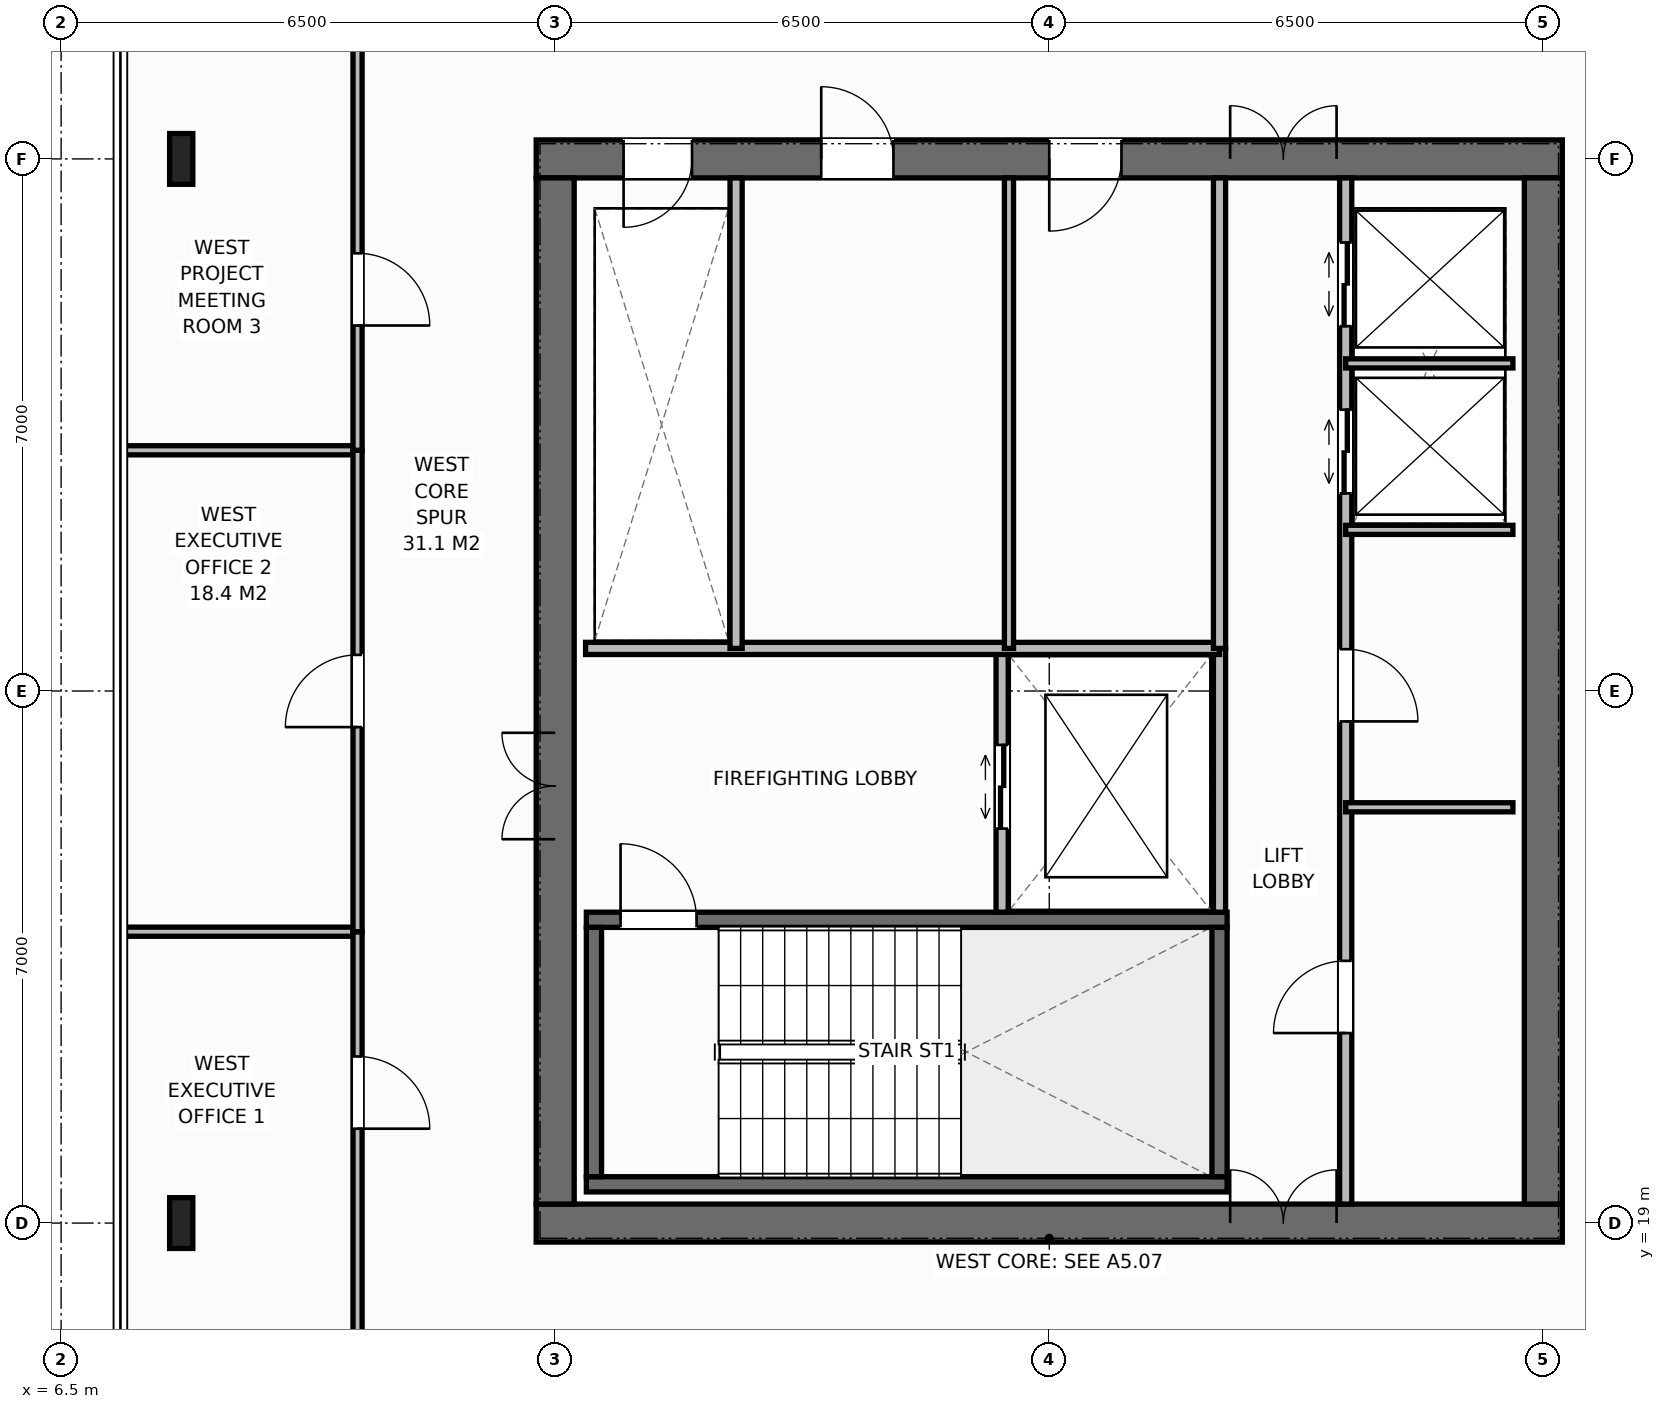
"""IFC4 building model, lengths in metres.
Left out: names, types, materials, properties, quantities, classifications, styles, units other than length and angle.
Written with IfcOpenShell. Run it as: python <this file> out.ifc"""

import sys

from ifc_helpers import new_model, si_unit, direction, frame, frame_2d, origin, origin_2d, place, context, subcontext, project, spatial, rectangle, i_section, extrude, element, fill, save


model = new_model("IFC4")
c1 = context("Model", 3, precision=1e-05, world=origin(), true_north=direction((0.0, 1.0)))
c2 = subcontext(c1, "Body", "Model", "MODEL_VIEW")
j1 = project(units=[si_unit("LENGTHUNIT", "METRE"), si_unit("PLANEANGLEUNIT", "RADIAN")], contexts=[c1])
p1 = place(None, origin())
s1 = spatial("IfcSite", under=j1, at=p1, CompositionType="ELEMENT")
p2 = place(p1, origin())
s2 = spatial("IfcBuilding", under=s1, at=p2, CompositionType="ELEMENT")
p3 = place(p2, frame((0.0, 0.0, 290.4)))
s3 = spatial("IfcBuildingStorey", under=s2, at=p3, CompositionType="ELEMENT", Elevation=290.4)
p4 = place(p3, frame((12.75, 19.0, 0.0), z_axis=(0.0, 0.0, 1.0), x_axis=(1.0, 0.0, 0.0)))
e1 = element("IfcWall", 1, at=p4, inside=s3, PredefinedType="SHEAR", context=c2, shape_type="SweptSolid", body=[
    extrude(rectangle(XDim=13.5, YDim=0.5, at=frame_2d((6.75, 0.0))), origin(), (0.0, 0.0, 1.0), 4.0),
])
p5 = place(p4, frame((9.13, 0.0, 0.0)))
e2 = element("IfcOpeningElement", 2, at=p5, cuts=e1, PredefinedType="OPENING", context=c2, shape_type="SweptSolid", body=[
    extrude(rectangle(XDim=1.4, YDim=2.2, at=frame_2d((0.7, 1.1))), frame((0.0, 0.26, 0.0), z_axis=(0.0, -1.0, 0.0), x_axis=(1.0, 0.0, 0.0)), (0.0, 0.0, 1.0), 0.52),
])
p6 = place(p3, frame((12.75, 33.0, 0.0), z_axis=(0.0, 0.0, 1.0), x_axis=(1.0, 0.0, 0.0)))
e3 = element("IfcWall", 3, at=p6, inside=s3, PredefinedType="SHEAR", context=c2, shape_type="SweptSolid", body=[
    extrude(rectangle(XDim=13.5, YDim=0.5, at=frame_2d((6.75, 0.0))), origin(), (0.0, 0.0, 1.0), 4.0),
])
p7 = place(p6, frame((1.15, 0.0, 0.0)))
e4 = element("IfcOpeningElement", 4, at=p7, cuts=e3, PredefinedType="OPENING", context=c2, shape_type="SweptSolid", body=[
    extrude(rectangle(XDim=0.9, YDim=2.15, at=frame_2d((0.45, 1.075))), frame((0.0, 0.26, 0.0), z_axis=(0.0, -1.0, 0.0), x_axis=(1.0, 0.0, 0.0)), (0.0, 0.0, 1.0), 0.52),
])
p8 = place(p6, frame((3.75, 0.0, 0.0)))
e5 = element("IfcOpeningElement", 5, at=p8, cuts=e3, PredefinedType="OPENING", context=c2, shape_type="SweptSolid", body=[
    extrude(rectangle(XDim=0.95, YDim=2.15, at=frame_2d((0.475, 1.075))), frame((0.0, 0.26, 0.0), z_axis=(0.0, -1.0, 0.0), x_axis=(1.0, 0.0, 0.0)), (0.0, 0.0, 1.0), 0.52),
])
p9 = place(p6, frame((6.75, 0.0, 0.0)))
e6 = element("IfcOpeningElement", 6, at=p9, cuts=e3, PredefinedType="OPENING", context=c2, shape_type="SweptSolid", body=[
    extrude(rectangle(XDim=0.95, YDim=2.15, at=frame_2d((0.475, 1.075))), frame((0.0, 0.26, 0.0), z_axis=(0.0, -1.0, 0.0), x_axis=(1.0, 0.0, 0.0)), (0.0, 0.0, 1.0), 0.52),
])
p10 = place(p6, frame((9.13, 0.0, 0.0)))
e7 = element("IfcOpeningElement", 7, at=p10, cuts=e3, PredefinedType="OPENING", context=c2, shape_type="SweptSolid", body=[
    extrude(rectangle(XDim=1.4, YDim=2.2, at=frame_2d((0.7, 1.1))), frame((0.0, 0.26, 0.0), z_axis=(0.0, -1.0, 0.0), x_axis=(1.0, 0.0, 0.0)), (0.0, 0.0, 1.0), 0.52),
])
p11 = place(p3, frame((13.0, 19.25, 0.0), z_axis=(0.0, 0.0, 1.0), x_axis=(0.0, 1.0, 0.0)))
e8 = element("IfcWall", 8, at=p11, inside=s3, PredefinedType="SHEAR", context=c2, shape_type="SweptSolid", body=[
    extrude(rectangle(XDim=13.5, YDim=0.5, at=frame_2d((6.75, 0.0))), origin(), (0.0, 0.0, 1.0), 4.0),
])
p12 = place(p11, frame((4.8, 0.0, 0.0)))
e9 = element("IfcOpeningElement", 9, at=p12, cuts=e8, PredefinedType="OPENING", context=c2, shape_type="SweptSolid", body=[
    extrude(rectangle(XDim=1.4, YDim=2.2, at=frame_2d((0.7, 1.1))), frame((0.0, 0.26, 0.0), z_axis=(0.0, -1.0, 0.0), x_axis=(1.0, 0.0, 0.0)), (0.0, 0.0, 1.0), 0.52),
])
p13 = place(p3, frame((26.0, 19.25, 0.0), z_axis=(0.0, 0.0, 1.0), x_axis=(0.0, 1.0, 0.0)))
e10 = element("IfcWall", 10, at=p13, inside=s3, PredefinedType="SHEAR", context=c2, shape_type="SweptSolid", body=[
    extrude(rectangle(XDim=13.5, YDim=0.5, at=frame_2d((6.75, 0.0))), origin(), (0.0, 0.0, 1.0), 4.0),
])
p14 = place(p3, frame((13.41, 19.51, 0.0), z_axis=(0.0, 0.0, 1.0), x_axis=(1.0, 0.0, 0.0)))
e11 = element("IfcWall", 11, at=p14, inside=s3, PredefinedType="SHEAR", context=c2, shape_type="SweptSolid", body=[
    extrude(rectangle(XDim=8.43, YDim=0.2, at=frame_2d((4.215, 0.0))), origin(), (0.0, 0.0, 1.0), 4.0),
])
p15 = place(p3, frame((13.41, 22.99, 0.0), z_axis=(0.0, 0.0, 1.0), x_axis=(1.0, 0.0, 0.0)))
e12 = element("IfcWall", 12, at=p15, inside=s3, PredefinedType="SHEAR", context=c2, shape_type="SweptSolid", body=[
    extrude(rectangle(XDim=8.43, YDim=0.2, at=frame_2d((4.215, 0.0))), origin(), (0.0, 0.0, 1.0), 4.0),
])
p16 = place(p15, frame((0.45, 0.0, 0.0)))
e13 = element("IfcOpeningElement", 13, at=p16, cuts=e12, PredefinedType="OPENING", context=c2, shape_type="SweptSolid", body=[
    extrude(rectangle(XDim=1.0, YDim=2.15, at=frame_2d((0.5, 1.075))), frame((0.0, 0.11, 0.0), z_axis=(0.0, -1.0, 0.0), x_axis=(1.0, 0.0, 0.0)), (0.0, 0.0, 1.0), 0.22),
])
for number, where, z_axis, x_axis in (
    (14, (13.51, 19.61, 0.0), (0.0, 0.0, 1.0), (0.0, 1.0, 0.0)),
    (15, (21.74, 19.61, 0.0), (0.0, 0.0, 1.0), (0.0, 1.0, 0.0)),
):
    element("IfcWall", number, at=place(p3, frame(where, z_axis=z_axis, x_axis=x_axis)), inside=s3, PredefinedType="SHEAR", context=c2, shape_type="SweptSolid", body=[
        extrude(rectangle(XDim=3.28, YDim=0.2, at=frame_2d((1.64, 0.0))), origin(), (0.0, 0.0, 1.0), 4.0),
    ])
for number, where, z_axis, x_axis in (
    (16, (8.08, 19.0, 0.0), (0.0, 0.0, 1.0), (1.0, 0.0, 0.0)),
    (17, (8.08, 33.0, 0.0), (0.0, 0.0, 1.0), (1.0, 0.0, 0.0)),
):
    element("IfcColumn", number, at=place(p3, frame(where, z_axis=z_axis, x_axis=x_axis)), inside=s3, PredefinedType="COLUMN", context=c2, shape_type="SweptSolid", body=[
        extrude(i_section(OverallWidth=0.305, OverallDepth=0.668, WebThickness=0.021, FlangeThickness=0.04, at=origin_2d()), origin(), (0.0, 0.0, 1.0), 4.0),
    ])
p17 = place(p3, frame((21.74, 23.09, 0.0), z_axis=(0.0, 0.0, 1.0), x_axis=(0.0, 1.0, 0.0)))
e18 = element("IfcWall", 18, at=p17, inside=s3, PredefinedType="STANDARD", context=c2, shape_type="SweptSolid", body=[
    extrude(rectangle(XDim=3.47, YDim=0.16, at=frame_2d((1.735, 0.0))), origin(), (0.0, 0.0, 1.0), 3.788),
])
p18 = place(p3, frame((18.88, 23.09, 0.0), z_axis=(0.0, 0.0, 1.0), x_axis=(0.0, 1.0, 0.0)))
e19 = element("IfcWall", 19, at=p18, inside=s3, PredefinedType="STANDARD", context=c2, shape_type="SweptSolid", body=[
    extrude(rectangle(XDim=3.47, YDim=0.16, at=frame_2d((1.735, 0.0))), origin(), (0.0, 0.0, 1.0), 3.788),
])
p19 = place(p18, frame((1.1, 0.0, 0.0)))
e20 = element("IfcOpeningElement", 20, at=p19, cuts=e19, PredefinedType="OPENING", context=c2, shape_type="SweptSolid", body=[
    extrude(rectangle(XDim=1.1, YDim=2.2, at=frame_2d((0.55, 1.1))), frame((0.0, 0.09, 0.0), z_axis=(0.0, -1.0, 0.0), x_axis=(1.0, 0.0, 0.0)), (0.0, 0.0, 1.0), 0.18),
])
p20 = place(p3, frame((13.4, 26.56, 0.0), z_axis=(0.0, 0.0, 1.0), x_axis=(1.0, 0.0, 0.0)))
e21 = element("IfcWall", 21, at=p20, inside=s3, PredefinedType="STANDARD", context=c2, shape_type="SweptSolid", body=[
    extrude(rectangle(XDim=8.34, YDim=0.16, at=frame_2d((4.17, 0.0))), origin(), (0.0, 0.0, 1.0), 3.788),
])
p21 = place(p3, frame((15.38, 26.56, 0.0), z_axis=(0.0, 0.0, 1.0), x_axis=(0.0, 1.0, 0.0)))
e22 = element("IfcWall", 22, at=p21, inside=s3, PredefinedType="STANDARD", context=c2, shape_type="SweptSolid", body=[
    extrude(rectangle(XDim=6.19, YDim=0.16, at=frame_2d((3.095, 0.0))), origin(), (0.0, 0.0, 1.0), 3.788),
])
p22 = place(p3, frame((18.97, 26.56, 0.0), z_axis=(0.0, 0.0, 1.0), x_axis=(0.0, 1.0, 0.0)))
e23 = element("IfcWall", 23, at=p22, inside=s3, PredefinedType="PARTITIONING", context=c2, shape_type="SweptSolid", body=[
    extrude(rectangle(XDim=6.19, YDim=0.12, at=frame_2d((3.095, 0.0))), origin(), (0.0, 0.0, 1.0), 3.788),
])
p23 = place(p3, frame((21.74, 26.56, 0.0), z_axis=(0.0, 0.0, 1.0), x_axis=(0.0, 1.0, 0.0)))
e24 = element("IfcWall", 24, at=p23, inside=s3, PredefinedType="STANDARD", context=c2, shape_type="SweptSolid", body=[
    extrude(rectangle(XDim=6.19, YDim=0.16, at=frame_2d((3.095, 0.0))), origin(), (0.0, 0.0, 1.0), 3.788),
])
p24 = place(p3, frame((23.4, 19.25, 0.0), z_axis=(0.0, 0.0, 1.0), x_axis=(0.0, 1.0, 0.0)))
e25 = element("IfcWall", 25, at=p24, inside=s3, PredefinedType="STANDARD", context=c2, shape_type="SweptSolid", body=[
    extrude(rectangle(XDim=13.5, YDim=0.16, at=frame_2d((6.75, 0.0))), origin(), (0.0, 0.0, 1.0), 3.788),
])
p25 = place(p24, frame((2.25, 0.0, 0.0)))
e26 = element("IfcOpeningElement", 26, at=p25, cuts=e25, PredefinedType="OPENING", context=c2, shape_type="SweptSolid", body=[
    extrude(rectangle(XDim=0.95, YDim=2.15, at=frame_2d((0.475, 1.075))), frame((0.0, 0.09, 0.0), z_axis=(0.0, -1.0, 0.0), x_axis=(1.0, 0.0, 0.0)), (0.0, 0.0, 1.0), 0.18),
])
p26 = place(p24, frame((6.35, 0.0, 0.0)))
e27 = element("IfcOpeningElement", 27, at=p26, cuts=e25, PredefinedType="OPENING", context=c2, shape_type="SweptSolid", body=[
    extrude(rectangle(XDim=0.95, YDim=2.15, at=frame_2d((0.475, 1.075))), frame((0.0, 0.09, 0.0), z_axis=(0.0, -1.0, 0.0), x_axis=(1.0, 0.0, 0.0)), (0.0, 0.0, 1.0), 0.18),
])
p27 = place(p24, frame((9.35, 0.0, 0.0)))
e28 = element("IfcOpeningElement", 28, at=p27, cuts=e25, PredefinedType="OPENING", context=c2, shape_type="SweptSolid", body=[
    extrude(rectangle(XDim=1.1, YDim=2.2, at=frame_2d((0.55, 1.1))), frame((0.0, 0.09, 0.0), z_axis=(0.0, -1.0, 0.0), x_axis=(1.0, 0.0, 0.0)), (0.0, 0.0, 1.0), 0.18),
])
p28 = place(p24, frame((11.55, 0.0, 0.0)))
e29 = element("IfcOpeningElement", 29, at=p28, cuts=e25, PredefinedType="OPENING", context=c2, shape_type="SweptSolid", body=[
    extrude(rectangle(XDim=1.1, YDim=2.2, at=frame_2d((0.55, 1.1))), frame((0.0, 0.09, 0.0), z_axis=(0.0, -1.0, 0.0), x_axis=(1.0, 0.0, 0.0)), (0.0, 0.0, 1.0), 0.18),
])
for number, where, z_axis, x_axis in (
    (30, (23.4, 24.47, 0.0), (0.0, 0.0, 1.0), (1.0, 0.0, 0.0)),
    (31, (23.4, 28.12, 0.0), (0.0, 0.0, 1.0), (1.0, 0.0, 0.0)),
    (32, (23.4, 30.31, 0.0), (0.0, 0.0, 1.0), (1.0, 0.0, 0.0)),
):
    element("IfcWall", number, at=place(p3, frame(where, z_axis=z_axis, x_axis=x_axis)), inside=s3, PredefinedType="PARTITIONING", context=c2, shape_type="SweptSolid", body=[
        extrude(rectangle(XDim=2.2, YDim=0.12, at=frame_2d((1.1, 0.0))), origin(), (0.0, 0.0, 1.0), 3.788),
    ])
p29 = place(p3, frame((7.22, 22.833, 0.0), z_axis=(0.0, 0.0, 1.0), x_axis=(1.0, 0.0, 0.0)))
e33 = element("IfcWall", 33, at=p29, inside=s3, PredefinedType="PARTITIONING", context=c2, shape_type="SweptSolid", body=[
    extrude(rectangle(XDim=3.18, YDim=0.12, at=frame_2d((1.59, 0.0))), origin(), (0.0, 0.0, 1.0), 3.788),
])
p30 = place(p3, frame((10.4, 16.5, 0.0), z_axis=(0.0, 0.0, 1.0), x_axis=(0.0, 1.0, 0.0)))
e34 = element("IfcWall", 34, at=p30, inside=s3, PredefinedType="PARTITIONING", context=c2, shape_type="SweptSolid", body=[
    extrude(rectangle(XDim=6.333, YDim=0.12, at=frame_2d((3.167, 0.0))), origin(), (0.0, 0.0, 1.0), 3.788),
])
p31 = place(p30, frame((3.742, 0.0, 0.0)))
e35 = element("IfcOpeningElement", 35, at=p31, cuts=e34, PredefinedType="OPENING", context=c2, shape_type="SweptSolid", body=[
    extrude(rectangle(XDim=0.95, YDim=2.15, at=frame_2d((0.475, 1.075))), frame((0.0, 0.07, 0.0), z_axis=(0.0, -1.0, 0.0), x_axis=(1.0, 0.0, 0.0)), (0.0, 0.0, 1.0), 0.14),
])
p32 = place(p3, frame((7.22, 29.167, 0.0), z_axis=(0.0, 0.0, 1.0), x_axis=(1.0, 0.0, 0.0)))
e36 = element("IfcWall", 36, at=p32, inside=s3, PredefinedType="PARTITIONING", context=c2, shape_type="SweptSolid", body=[
    extrude(rectangle(XDim=3.18, YDim=0.12, at=frame_2d((1.59, 0.0))), origin(), (0.0, 0.0, 1.0), 3.788),
])
p33 = place(p3, frame((10.4, 22.833, 0.0), z_axis=(0.0, 0.0, 1.0), x_axis=(0.0, 1.0, 0.0)))
e37 = element("IfcWall", 37, at=p33, inside=s3, PredefinedType="PARTITIONING", context=c2, shape_type="SweptSolid", body=[
    extrude(rectangle(XDim=6.333, YDim=0.12, at=frame_2d((3.167, 0.0))), origin(), (0.0, 0.0, 1.0), 3.788),
])
p34 = place(p33, frame((2.692, 0.0, 0.0)))
e38 = element("IfcOpeningElement", 38, at=p34, cuts=e37, PredefinedType="OPENING", context=c2, shape_type="SweptSolid", body=[
    extrude(rectangle(XDim=0.95, YDim=2.15, at=frame_2d((0.475, 1.075))), frame((0.0, 0.07, 0.0), z_axis=(0.0, -1.0, 0.0), x_axis=(1.0, 0.0, 0.0)), (0.0, 0.0, 1.0), 0.14),
])
p35 = place(p3, frame((10.4, 29.167, 0.0), z_axis=(0.0, 0.0, 1.0), x_axis=(0.0, 1.0, 0.0)))
e39 = element("IfcWall", 39, at=p35, inside=s3, PredefinedType="PARTITIONING", context=c2, shape_type="SweptSolid", body=[
    extrude(rectangle(XDim=6.333, YDim=0.12, at=frame_2d((3.167, 0.0))), origin(), (0.0, 0.0, 1.0), 3.788),
])
p36 = place(p35, frame((1.642, 0.0, 0.0)))
e40 = element("IfcOpeningElement", 40, at=p36, cuts=e39, PredefinedType="OPENING", context=c2, shape_type="SweptSolid", body=[
    extrude(rectangle(XDim=0.95, YDim=2.15, at=frame_2d((0.475, 1.075))), frame((0.0, 0.07, 0.0), z_axis=(0.0, -1.0, 0.0), x_axis=(1.0, 0.0, 0.0)), (0.0, 0.0, 1.0), 0.14),
])
p37 = place(p16, origin())
e41 = element("IfcDoor", 41, at=p37, inside=s3, OperationType="SINGLE_SWING_LEFT", PredefinedType="DOOR", context=c2, shape_type="SweptSolid", body=[
    extrude(rectangle(XDim=1.0, YDim=2.15, at=frame_2d((0.5, 1.075))), frame((0.0, 0.025, 0.0), z_axis=(0.0, -1.0, 0.0), x_axis=(1.0, 0.0, 0.0)), (0.0, 0.0, 1.0), 0.05),
])
fill(e13, e41)
p38 = place(p12, origin())
e42 = element("IfcDoor", 42, at=p38, inside=s3, OperationType="DOUBLE_DOOR_SINGLE_SWING", PredefinedType="DOOR", context=c2, shape_type="SweptSolid", body=[
    extrude(rectangle(XDim=1.4, YDim=2.2, at=frame_2d((0.7, 1.1))), frame((0.0, 0.025, 0.0), z_axis=(0.0, -1.0, 0.0), x_axis=(1.0, 0.0, 0.0)), (0.0, 0.0, 1.0), 0.05),
])
fill(e9, e42)
p39 = place(p19, origin())
e43 = element("IfcDoor", 43, at=p39, inside=s3, OperationType="DOUBLE_DOOR_SLIDING", PredefinedType="DOOR", context=c2, shape_type="SweptSolid", body=[
    extrude(rectangle(XDim=1.1, YDim=2.2, at=frame_2d((0.55, 1.1))), frame((0.0, 0.025, 0.0), z_axis=(0.0, -1.0, 0.0), x_axis=(1.0, 0.0, 0.0)), (0.0, 0.0, 1.0), 0.05),
])
fill(e20, e43)
p40 = place(p7, origin())
e44 = element("IfcDoor", 44, at=p40, inside=s3, OperationType="SINGLE_SWING_RIGHT", PredefinedType="DOOR", context=c2, shape_type="SweptSolid", body=[
    extrude(rectangle(XDim=0.9, YDim=2.15, at=frame_2d((0.45, 1.075))), frame((0.0, -0.025, 0.0), z_axis=(0.0, -1.0, 0.0), x_axis=(1.0, 0.0, 0.0)), (0.0, 0.0, 1.0), 0.05),
])
fill(e4, e44)
p41 = place(p8, origin())
e45 = element("IfcDoor", 45, at=p41, inside=s3, OperationType="SINGLE_SWING_LEFT", PredefinedType="DOOR", context=c2, shape_type="SweptSolid", body=[
    extrude(rectangle(XDim=0.95, YDim=2.15, at=frame_2d((0.475, 1.075))), frame((0.0, -0.025, 0.0), z_axis=(0.0, -1.0, 0.0), x_axis=(1.0, 0.0, 0.0)), (0.0, 0.0, 1.0), 0.05),
])
fill(e5, e45)
p42 = place(p9, origin())
e46 = element("IfcDoor", 46, at=p42, inside=s3, OperationType="SINGLE_SWING_RIGHT", PredefinedType="DOOR", context=c2, shape_type="SweptSolid", body=[
    extrude(rectangle(XDim=0.95, YDim=2.15, at=frame_2d((0.475, 1.075))), frame((0.0, -0.025, 0.0), z_axis=(0.0, -1.0, 0.0), x_axis=(1.0, 0.0, 0.0)), (0.0, 0.0, 1.0), 0.05),
])
fill(e6, e46)
p43 = place(p5, origin())
e47 = element("IfcDoor", 47, at=p43, inside=s3, OperationType="DOUBLE_DOOR_SINGLE_SWING", PredefinedType="DOOR", context=c2, shape_type="SweptSolid", body=[
    extrude(rectangle(XDim=1.4, YDim=2.2, at=frame_2d((0.7, 1.1))), frame((0.0, 0.075, 0.0), z_axis=(0.0, -1.0, 0.0), x_axis=(1.0, 0.0, 0.0)), (0.0, 0.0, 1.0), 0.05),
])
fill(e2, e47)
p44 = place(p10, origin())
e48 = element("IfcDoor", 48, at=p44, inside=s3, OperationType="DOUBLE_DOOR_SINGLE_SWING", PredefinedType="DOOR", context=c2, shape_type="SweptSolid", body=[
    extrude(rectangle(XDim=1.4, YDim=2.2, at=frame_2d((0.7, 1.1))), frame((0.0, -0.025, 0.0), z_axis=(0.0, -1.0, 0.0), x_axis=(1.0, 0.0, 0.0)), (0.0, 0.0, 1.0), 0.05),
])
fill(e7, e48)
p45 = place(p25, origin())
e49 = element("IfcDoor", 49, at=p45, inside=s3, OperationType="SINGLE_SWING_LEFT", PredefinedType="DOOR", context=c2, shape_type="SweptSolid", body=[
    extrude(rectangle(XDim=0.95, YDim=2.15, at=frame_2d((0.475, 1.075))), frame((0.0, 0.025, 0.0), z_axis=(0.0, -1.0, 0.0), x_axis=(1.0, 0.0, 0.0)), (0.0, 0.0, 1.0), 0.05),
])
fill(e26, e49)
p46 = place(p26, origin())
e50 = element("IfcDoor", 50, at=p46, inside=s3, OperationType="SINGLE_SWING_RIGHT", PredefinedType="DOOR", context=c2, shape_type="SweptSolid", body=[
    extrude(rectangle(XDim=0.95, YDim=2.15, at=frame_2d((0.475, 1.075))), frame((0.0, 0.025, 0.0), z_axis=(0.0, -1.0, 0.0), x_axis=(1.0, 0.0, 0.0)), (0.0, 0.0, 1.0), 0.05),
])
fill(e27, e50)
p47 = place(p27, origin())
e51 = element("IfcDoor", 51, at=p47, inside=s3, OperationType="DOUBLE_DOOR_SLIDING", PredefinedType="DOOR", context=c2, shape_type="SweptSolid", body=[
    extrude(rectangle(XDim=1.1, YDim=2.2, at=frame_2d((0.55, 1.1))), frame((0.0, 0.025, 0.0), z_axis=(0.0, -1.0, 0.0), x_axis=(1.0, 0.0, 0.0)), (0.0, 0.0, 1.0), 0.05),
])
fill(e28, e51)
p48 = place(p28, origin())
e52 = element("IfcDoor", 52, at=p48, inside=s3, OperationType="DOUBLE_DOOR_SLIDING", PredefinedType="DOOR", context=c2, shape_type="SweptSolid", body=[
    extrude(rectangle(XDim=1.1, YDim=2.2, at=frame_2d((0.55, 1.1))), frame((0.0, 0.025, 0.0), z_axis=(0.0, -1.0, 0.0), x_axis=(1.0, 0.0, 0.0)), (0.0, 0.0, 1.0), 0.05),
])
fill(e29, e52)
p49 = place(p31, origin())
e53 = element("IfcDoor", 53, at=p49, inside=s3, OperationType="SINGLE_SWING_RIGHT", PredefinedType="DOOR", context=c2, shape_type="SweptSolid", body=[
    extrude(rectangle(XDim=0.95, YDim=2.15, at=frame_2d((0.475, 1.075))), frame((0.0, 0.025, 0.0), z_axis=(0.0, -1.0, 0.0), x_axis=(1.0, 0.0, 0.0)), (0.0, 0.0, 1.0), 0.05),
])
fill(e35, e53)
p50 = place(p34, origin())
e54 = element("IfcDoor", 54, at=p50, inside=s3, OperationType="SINGLE_SWING_LEFT", PredefinedType="DOOR", context=c2, shape_type="SweptSolid", body=[
    extrude(rectangle(XDim=0.95, YDim=2.15, at=frame_2d((0.475, 1.075))), frame((0.0, 0.025, 0.0), z_axis=(0.0, -1.0, 0.0), x_axis=(1.0, 0.0, 0.0)), (0.0, 0.0, 1.0), 0.05),
])
fill(e38, e54)
p51 = place(p36, origin())
e55 = element("IfcDoor", 55, at=p51, inside=s3, OperationType="SINGLE_SWING_RIGHT", PredefinedType="DOOR", context=c2, shape_type="SweptSolid", body=[
    extrude(rectangle(XDim=0.95, YDim=2.15, at=frame_2d((0.475, 1.075))), frame((0.0, 0.025, 0.0), z_axis=(0.0, -1.0, 0.0), x_axis=(1.0, 0.0, 0.0)), (0.0, 0.0, 1.0), 0.05),
])
fill(e40, e55)
save(model, sys.argv[1])
